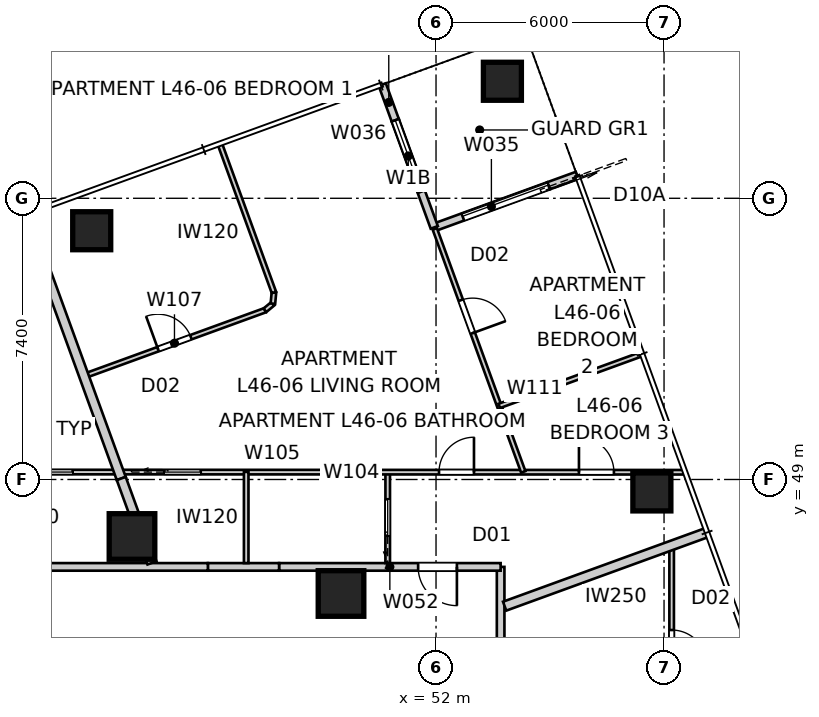
"""IFC4 building model, lengths in metres.
Left out: names, types, materials, properties, quantities, classifications, styles, units other than length and angle.
Written with IfcOpenShell. Run it as: python <this file> out.ifc"""

import sys

from ifc_helpers import new_model, si_unit, direction, frame, frame_2d, origin, origin_2d, place, context, subcontext, project, spatial, rectangle, extrude, element, fill, save


model = new_model("IFC4")
c1 = context("Model", 3, precision=1e-05, world=origin(), true_north=direction((0.0, 1.0)))
c2 = subcontext(c1, "Body", "Model", "MODEL_VIEW")
j1 = project(units=[si_unit("LENGTHUNIT", "METRE"), si_unit("PLANEANGLEUNIT", "RADIAN")], contexts=[c1])
p1 = place(None, origin())
s1 = spatial("IfcSite", under=j1, at=p1, CompositionType="ELEMENT")
p2 = place(p1, origin())
s2 = spatial("IfcBuilding", under=s1, at=p2, CompositionType="ELEMENT")
p3 = place(p2, frame((0.0, 0.0, 167.6)))
s3 = spatial("IfcBuildingStorey", under=s2, at=p3, CompositionType="ELEMENT", Elevation=167.6)
for number, where, z_axis, x_axis in (
    (1, (57.68, 48.673, 0.0), (0.0, 0.0, 1.0), (1.0, 0.0, 0.0)),
    (2, (53.747, 59.479, 0.0), (0.0, 0.0, 1.0), (1.0, 0.0, 0.0)),
    (3, (42.94, 55.546, 0.0), (0.0, 0.0, 1.0), (1.0, 0.0, 0.0)),
):
    element("IfcColumn", number, at=place(p3, frame(where, z_axis=z_axis, x_axis=x_axis)), inside=s3, PredefinedType="COLUMN", context=c2, shape_type="SweptSolid", body=[
        extrude(rectangle(XDim=1.0, YDim=1.0, at=origin_2d()), origin(), (0.0, 0.0, 1.0), 3.2),
    ])
for number, where, z_axis, x_axis in (
    (4, (49.5, 46.0, 0.0), (0.0, 0.0, 1.0), (1.0, 0.0, 0.0)),
    (5, (44.0, 47.5, 0.0), (0.0, 0.0, 1.0), (1.0, 0.0, 0.0)),
):
    element("IfcColumn", number, at=place(p3, frame(where, z_axis=z_axis, x_axis=x_axis)), inside=s3, PredefinedType="COLUMN", context=c2, shape_type="SweptSolid", body=[
        extrude(rectangle(XDim=1.2, YDim=1.2, at=origin_2d()), origin(), (0.0, 0.0, 1.0), 3.4),
    ])
p4 = place(p3, frame((55.712, 57.002, 0.0), z_axis=(0.0, 0.0, 1.0), x_axis=(-0.939659694648, -0.342110593602, 0.0)))
e6 = element("IfcWall", 6, at=p4, inside=s3, PredefinedType="SOLIDWALL", context=c2, shape_type="SweptSolid", body=[
    extrude(rectangle(XDim=0.8, YDim=0.2, at=frame_2d((0.4, 0.0))), origin(), (0.0, 0.0, 1.0), 3.2),
])
p5 = place(p3, frame((54.96, 56.729, 0.0), z_axis=(0.0, 0.0, 1.0), x_axis=(-0.939693144909, -0.342018703306, 0.0)))
e7 = element("IfcWall", 7, at=p5, inside=s3, PredefinedType="SOLIDWALL", context=c2, shape_type="SweptSolid", body=[
    extrude(rectangle(XDim=3.2, YDim=0.2, at=frame_2d((1.6, 0.0))), origin(), (0.0, 0.0, 1.0), 2.588),
])
p6 = place(p5, origin())
e8 = element("IfcOpeningElement", 8, at=p6, cuts=e7, PredefinedType="OPENING", context=c2, shape_type="SweptSolid", body=[
    extrude(rectangle(XDim=2.4, YDim=2.1, at=frame_2d((1.2, 1.05))), frame((0.0, 0.11, 0.0), z_axis=(0.0, -1.0, 0.0), x_axis=(1.0, 0.0, 0.0)), (0.0, 0.0, 1.0), 0.22),
])
p7 = place(p3, frame((51.953, 55.634, 0.0), z_axis=(0.0, 0.0, 1.0), x_axis=(-0.341965219194, 0.939712609717, 0.0)))
e9 = element("IfcWall", 9, at=p7, inside=s3, PredefinedType="SOLIDWALL", context=c2, shape_type="SweptSolid", body=[
    extrude(rectangle(XDim=3.0, YDim=0.2, at=frame_2d((1.5, 0.0))), origin(), (0.0, 0.0, 1.0), 2.588),
])
p8 = place(p7, frame((1.0, 0.0, 0.4)))
e10 = element("IfcOpeningElement", 10, at=p8, cuts=e9, PredefinedType="OPENING", context=c2, shape_type="SweptSolid", body=[
    extrude(rectangle(XDim=2.0, YDim=1.8, at=frame_2d((1.0, 0.9))), frame((0.0, 0.11, 0.0), z_axis=(0.0, -1.0, 0.0), x_axis=(1.0, 0.0, 0.0)), (0.0, 0.0, 1.0), 0.22),
])
p9 = place(p3, frame((50.927, 58.453, 0.0), z_axis=(0.0, 0.0, 1.0), x_axis=(-0.342037080957, 0.939686455819, 0.0)))
e11 = element("IfcWall", 11, at=p9, inside=s3, PredefinedType="SOLIDWALL", context=c2, shape_type="SweptSolid", body=[
    extrude(rectangle(XDim=1.0, YDim=0.2, at=frame_2d((0.5, 0.0))), origin(), (0.0, 0.0, 1.0), 3.2),
])
p10 = place(p3, frame((53.7, 12.9, 0.0), z_axis=(0.0, 0.0, 1.0), x_axis=(0.0, 1.0, 0.0)))
e12 = element("IfcWall", 12, at=p10, inside=s3, PredefinedType="PARTITIONING", context=c2, shape_type="SweptSolid", body=[
    extrude(rectangle(XDim=33.8, YDim=0.2, at=frame_2d((16.9, 0.0))), origin(), (0.0, 0.0, 1.0), 3.2),
])
p11 = place(p10, frame((29.25, 0.0, 0.0)))
e13 = element("IfcOpeningElement", 13, at=p11, cuts=e12, PredefinedType="OPENING", context=c2, shape_type="SweptSolid", body=[
    extrude(rectangle(XDim=1.02, YDim=2.0, at=frame_2d((0.51, 1.0))), frame((0.0, 0.11, 0.0), z_axis=(0.0, -1.0, 0.0), x_axis=(1.0, 0.0, 0.0)), (0.0, 0.0, 1.0), 0.22),
])
p12 = place(p10, frame((2.87, 0.0, 0.0)))
e14 = element("IfcOpeningElement", 14, at=p12, cuts=e12, PredefinedType="OPENING", context=c2, shape_type="SweptSolid", body=[
    extrude(rectangle(XDim=1.02, YDim=2.34, at=frame_2d((0.51, 1.17))), frame((0.0, 0.11, 0.0), z_axis=(0.0, -1.0, 0.0), x_axis=(1.0, 0.0, 0.0)), (0.0, 0.0, 1.0), 0.22),
])
p13 = place(p3, frame((53.7, 46.7, 0.0), z_axis=(0.0, 0.0, 1.0), x_axis=(-1.0, 0.0, 0.0)))
e15 = element("IfcWall", 15, at=p13, inside=s3, PredefinedType="PARTITIONING", context=c2, shape_type="SweptSolid", body=[
    extrude(rectangle(XDim=5.83, YDim=0.2, at=frame_2d((2.915, 0.0))), origin(), (0.0, 0.0, 1.0), 3.2),
])
p14 = place(p13, frame((1.151, 0.0, 0.0)))
e16 = element("IfcOpeningElement", 16, at=p14, cuts=e15, PredefinedType="OPENING", context=c2, shape_type="SweptSolid", body=[
    extrude(rectangle(XDim=1.02, YDim=2.34, at=frame_2d((0.51, 1.17))), frame((0.0, 0.11, 0.0), z_axis=(0.0, -1.0, 0.0), x_axis=(1.0, 0.0, 0.0)), (0.0, 0.0, 1.0), 0.22),
])
p15 = place(p3, frame((47.87, 46.7, 0.0), z_axis=(0.0, 0.0, 1.0), x_axis=(-1.0, 0.0, 0.0)))
e17 = element("IfcWall", 17, at=p15, inside=s3, PredefinedType="PARTITIONING", context=c2, shape_type="SweptSolid", body=[
    extrude(rectangle(XDim=1.874, YDim=0.2, at=frame_2d((0.937, 0.0))), origin(), (0.0, 0.0, 1.0), 2.2),
])
p16 = place(p3, frame((45.997, 46.7, 0.0), z_axis=(0.0, 0.0, 1.0), x_axis=(-1.0, 0.0, 0.0)))
e18 = element("IfcWall", 18, at=p16, inside=s3, PredefinedType="PARTITIONING", context=c2, shape_type="SweptSolid", body=[
    extrude(rectangle(XDim=11.993, YDim=0.2, at=frame_2d((5.997, 0.0))), origin(), (0.0, 0.0, 1.0), 3.2),
])
p17 = place(p3, frame((59.132, 47.605, 0.0), z_axis=(0.0, 0.0, 1.0), x_axis=(-0.939690274876, -0.342026588591, 0.0)))
e19 = element("IfcWall", 19, at=p17, inside=s3, PredefinedType="PARTITIONING", context=c2, shape_type="SweptSolid", body=[
    extrude(rectangle(XDim=5.669, YDim=0.25, at=frame_2d((2.834, 0.0))), origin(), (0.0, 0.0, 1.0), 3.2),
])
p18 = place(p3, frame((41.531, 55.033, 0.0), z_axis=(0.0, 0.0, 1.0), x_axis=(0.341991425514, -0.939703072718, 0.0)))
e20 = element("IfcWall", 20, at=p18, inside=s3, PredefinedType="PARTITIONING", context=c2, shape_type="SweptSolid", body=[
    extrude(rectangle(XDim=6.393, YDim=0.25, at=frame_2d((3.196, 0.0))), origin(), (0.0, 0.0, 1.0), 2.588),
])
p19 = place(p3, frame((43.717, 49.026, 0.0), z_axis=(0.0, 0.0, 1.0), x_axis=(0.342049950026, -0.939681771499, 0.0)))
e21 = element("IfcWall", 21, at=p19, inside=s3, PredefinedType="PARTITIONING", context=c2, shape_type="SweptSolid", body=[
    extrude(rectangle(XDim=2.363, YDim=0.25, at=frame_2d((1.182, 0.0))), origin(), (0.0, 0.0, 1.0), 3.2),
])
p20 = place(p3, frame((58.2, 47.266, 0.0), z_axis=(0.0, 0.0, 1.0), x_axis=(0.0, -1.0, 0.0)))
e22 = element("IfcWall", 22, at=p20, inside=s3, PredefinedType="PARTITIONING", context=c2, shape_type="SweptSolid", body=[
    extrude(rectangle(XDim=36.14, YDim=0.12, at=frame_2d((18.07, 0.0))), origin(), (0.0, 0.0, 1.0), 3.2),
])
p21 = place(p20, frame((2.227, 0.0, 0.0)))
e23 = element("IfcOpeningElement", 23, at=p21, cuts=e22, PredefinedType="OPENING", context=c2, shape_type="SweptSolid", body=[
    extrude(rectangle(XDim=0.92, YDim=2.34, at=frame_2d((0.46, 1.17))), frame((0.0, 0.07, 0.0), z_axis=(0.0, -1.0, 0.0), x_axis=(1.0, 0.0, 0.0)), (0.0, 0.0, 1.0), 0.14),
])
p22 = place(p20, frame((5.95, 0.0, 0.0)))
e24 = element("IfcOpeningElement", 24, at=p22, cuts=e22, PredefinedType="OPENING", context=c2, shape_type="SweptSolid", body=[
    extrude(rectangle(XDim=0.92, YDim=2.34, at=frame_2d((0.46, 1.17))), frame((0.0, 0.07, 0.0), z_axis=(0.0, -1.0, 0.0), x_axis=(1.0, 0.0, 0.0)), (0.0, 0.0, 1.0), 0.14),
])
p23 = place(p20, frame((29.769, 0.0, 0.0)))
e25 = element("IfcOpeningElement", 25, at=p23, cuts=e22, PredefinedType="OPENING", context=c2, shape_type="SweptSolid", body=[
    extrude(rectangle(XDim=0.92, YDim=2.34, at=frame_2d((0.46, 1.17))), frame((0.0, 0.07, 0.0), z_axis=(0.0, -1.0, 0.0), x_axis=(1.0, 0.0, 0.0)), (0.0, 0.0, 1.0), 0.14),
])
p24 = place(p20, frame((14.168, 0.0, 0.0)))
e26 = element("IfcOpeningElement", 26, at=p24, cuts=e22, PredefinedType="OPENING", context=c2, shape_type="SweptSolid", body=[
    extrude(rectangle(XDim=0.92, YDim=2.34, at=frame_2d((0.46, 1.17))), frame((0.0, 0.07, 0.0), z_axis=(0.0, -1.0, 0.0), x_axis=(1.0, 0.0, 0.0)), (0.0, 0.0, 1.0), 0.14),
])
p25 = place(p20, frame((33.434, 0.0, 0.0)))
e27 = element("IfcOpeningElement", 27, at=p25, cuts=e22, PredefinedType="OPENING", context=c2, shape_type="SweptSolid", body=[
    extrude(rectangle(XDim=0.92, YDim=2.34, at=frame_2d((0.46, 1.17))), frame((0.0, 0.07, 0.0), z_axis=(0.0, -1.0, 0.0), x_axis=(1.0, 0.0, 0.0)), (0.0, 0.0, 1.0), 0.14),
])
p26 = place(p3, frame((50.729, 46.8, 0.0), z_axis=(0.0, 0.0, 1.0), x_axis=(0.0, 1.0, 0.0)))
e28 = element("IfcWall", 28, at=p26, inside=s3, PredefinedType="PARTITIONING", context=c2, shape_type="SweptSolid", body=[
    extrude(rectangle(XDim=2.4, YDim=0.12, at=frame_2d((1.2, 0.0))), origin(), (0.0, 0.0, 1.0), 3.2),
])
p27 = place(p26, frame((0.72, 0.0, 0.0)))
e29 = element("IfcOpeningElement", 29, at=p27, cuts=e28, PredefinedType="OPENING", context=c2, shape_type="SweptSolid", body=[
    extrude(rectangle(XDim=0.96, YDim=2.1, at=frame_2d((0.48, 1.05))), frame((0.0, 0.07, 0.0), z_axis=(0.0, -1.0, 0.0), x_axis=(1.0, 0.0, 0.0)), (0.0, 0.0, 1.0), 0.14),
])
p28 = place(p3, frame((27.691, 49.2, 0.0), z_axis=(0.0, 0.0, 1.0), x_axis=(0.999999952285, -0.000308918217, 0.0)))
e30 = element("IfcWall", 30, at=p28, inside=s3, PredefinedType="PARTITIONING", context=c2, shape_type="SweptSolid", body=[
    extrude(rectangle(XDim=30.822, YDim=0.12, at=frame_2d((15.411, 0.0))), origin(), (0.0, 0.0, 1.0), 3.2),
])
p29 = place(p28, frame((5.882, 0.0, 0.0)))
e31 = element("IfcOpeningElement", 31, at=p29, cuts=e30, PredefinedType="OPENING", context=c2, shape_type="SweptSolid", body=[
    extrude(rectangle(XDim=0.92, YDim=2.34, at=frame_2d((0.46, 1.17))), frame((0.0, 0.07, 0.0), z_axis=(0.0, -1.0, 0.0), x_axis=(1.0, 0.0, 0.0)), (0.0, 0.0, 1.0), 0.14),
])
p30 = place(p28, frame((28.07, 0.0, 0.0)))
e32 = element("IfcOpeningElement", 32, at=p30, cuts=e30, PredefinedType="OPENING", context=c2, shape_type="SweptSolid", body=[
    extrude(rectangle(XDim=0.92, YDim=2.34, at=frame_2d((0.46, 1.17))), frame((0.0, 0.07, 0.0), z_axis=(0.0, -1.0, 0.0), x_axis=(1.0, 0.0, 0.0)), (0.0, 0.0, 1.0), 0.14),
])
p31 = place(p28, frame((24.388, 0.0, 0.0)))
e33 = element("IfcOpeningElement", 33, at=p31, cuts=e30, PredefinedType="OPENING", context=c2, shape_type="SweptSolid", body=[
    extrude(rectangle(XDim=0.92, YDim=2.34, at=frame_2d((0.46, 1.17))), frame((0.0, 0.07, 0.0), z_axis=(0.0, -1.0, 0.0), x_axis=(1.0, 0.0, 0.0)), (0.0, 0.0, 1.0), 0.14),
])
p32 = place(p28, frame((1.506, 0.0, 0.0)))
e34 = element("IfcOpeningElement", 34, at=p32, cuts=e30, PredefinedType="OPENING", context=c2, shape_type="SweptSolid", body=[
    extrude(rectangle(XDim=0.96, YDim=2.1, at=frame_2d((0.48, 1.05))), frame((0.0, 0.07, 0.0), z_axis=(0.0, -1.0, 0.0), x_axis=(1.0, 0.0, 0.0)), (0.0, 0.0, 1.0), 0.14),
])
p33 = place(p28, frame((17.158, 0.0, 0.0)))
e35 = element("IfcOpeningElement", 35, at=p33, cuts=e30, PredefinedType="OPENING", context=c2, shape_type="SweptSolid", body=[
    extrude(rectangle(XDim=0.96, YDim=2.1, at=frame_2d((0.48, 1.05))), frame((0.0, 0.07, 0.0), z_axis=(0.0, -1.0, 0.0), x_axis=(1.0, 0.0, 0.0)), (0.0, 0.0, 1.0), 0.14),
])
p34 = place(p28, frame((9.026, 0.0, 0.0)))
e36 = element("IfcOpeningElement", 36, at=p34, cuts=e30, PredefinedType="OPENING", context=c2, shape_type="SweptSolid", body=[
    extrude(rectangle(XDim=0.96, YDim=2.1, at=frame_2d((0.48, 1.05))), frame((0.0, 0.07, 0.0), z_axis=(0.0, -1.0, 0.0), x_axis=(1.0, 0.0, 0.0)), (0.0, 0.0, 1.0), 0.14),
])
p35 = place(p28, frame((13.788, 0.0, 0.0)))
e37 = element("IfcOpeningElement", 37, at=p35, cuts=e30, PredefinedType="OPENING", context=c2, shape_type="SweptSolid", body=[
    extrude(rectangle(XDim=0.96, YDim=2.1, at=frame_2d((0.48, 1.05))), frame((0.0, 0.07, 0.0), z_axis=(0.0, -1.0, 0.0), x_axis=(1.0, 0.0, 0.0)), (0.0, 0.0, 1.0), 0.14),
])
p36 = place(p3, frame((47.005, 46.8, 0.0), z_axis=(0.0, 0.0, 1.0), x_axis=(0.0, 1.0, 0.0)))
e38 = element("IfcWall", 38, at=p36, inside=s3, PredefinedType="PARTITIONING", context=c2, shape_type="SweptSolid", body=[
    extrude(rectangle(XDim=2.4, YDim=0.12, at=frame_2d((1.2, 0.0))), origin(), (0.0, 0.0, 1.0), 3.2),
])
p37 = place(p3, frame((42.736, 51.72, 0.0), z_axis=(0.0, 0.0, 1.0), x_axis=(0.939707596988, 0.341978993747, 0.0)))
e39 = element("IfcWall", 39, at=p37, inside=s3, PredefinedType="PARTITIONING", context=c2, shape_type="SweptSolid", body=[
    extrude(rectangle(XDim=5.068, YDim=0.12, at=frame_2d((2.534, 0.0))), origin(), (0.0, 0.0, 1.0), 3.2),
])
p38 = place(p37, frame((2.074, 0.0, 0.0)))
e40 = element("IfcOpeningElement", 40, at=p38, cuts=e39, PredefinedType="OPENING", context=c2, shape_type="SweptSolid", body=[
    extrude(rectangle(XDim=0.92, YDim=2.34, at=frame_2d((0.46, 1.17))), frame((0.0, 0.07, 0.0), z_axis=(0.0, -1.0, 0.0), x_axis=(1.0, 0.0, 0.0)), (0.0, 0.0, 1.0), 0.14),
])
p39 = place(p3, frame((47.499, 53.453, 0.0), z_axis=(0.0, 0.0, 1.0), x_axis=(0.769326440299, 0.638855874401, 0.0)))
e41 = element("IfcWall", 41, at=p39, inside=s3, PredefinedType="PARTITIONING", context=c2, shape_type="SweptSolid", body=[
    extrude(rectangle(XDim=0.271, YDim=0.12, at=frame_2d((0.136, 0.0))), origin(), (0.0, 0.0, 1.0), 3.2),
])
p40 = place(p3, frame((47.708, 53.627, 0.0), z_axis=(0.0, 0.0, 1.0), x_axis=(0.092395121176, 0.995722421955, 0.0)))
e42 = element("IfcWall", 42, at=p40, inside=s3, PredefinedType="PARTITIONING", context=c2, shape_type="SweptSolid", body=[
    extrude(rectangle(XDim=0.296, YDim=0.12, at=frame_2d((0.148, 0.0))), origin(), (0.0, 0.0, 1.0), 3.2),
])
p41 = place(p3, frame((47.735, 53.921, 0.0), z_axis=(0.0, 0.0, 1.0), x_axis=(-0.342004304159, 0.93969838562, 0.0)))
e43 = element("IfcWall", 43, at=p41, inside=s3, PredefinedType="PARTITIONING", context=c2, shape_type="SweptSolid", body=[
    extrude(rectangle(XDim=4.127, YDim=0.12, at=frame_2d((2.063, 0.0))), origin(), (0.0, 0.0, 1.0), 3.2),
])
p42 = place(p3, frame((51.967, 55.597, 0.0), z_axis=(0.0, 0.0, 1.0), x_axis=(0.342039648023, -0.939685521427, 0.0)))
e44 = element("IfcWall", 44, at=p42, inside=s3, PredefinedType="PARTITIONING", context=c2, shape_type="SweptSolid", body=[
    extrude(rectangle(XDim=6.807, YDim=0.12, at=frame_2d((3.404, 0.0))), origin(), (0.0, 0.0, 1.0), 3.2),
])
p43 = place(p42, frame((2.0, 0.0, 0.0)))
e45 = element("IfcOpeningElement", 45, at=p43, cuts=e44, PredefinedType="OPENING", context=c2, shape_type="SweptSolid", body=[
    extrude(rectangle(XDim=0.92, YDim=2.34, at=frame_2d((0.46, 1.17))), frame((0.0, 0.07, 0.0), z_axis=(0.0, -1.0, 0.0), x_axis=(1.0, 0.0, 0.0)), (0.0, 0.0, 1.0), 0.14),
])
p44 = place(p3, frame((57.385, 52.29, 0.0), z_axis=(0.0, 0.0, 1.0), x_axis=(-0.939685374709, -0.342040051101, 0.0)))
e46 = element("IfcWall", 46, at=p44, inside=s3, PredefinedType="PARTITIONING", context=c2, shape_type="SweptSolid", body=[
    extrude(rectangle(XDim=3.96, YDim=0.12, at=frame_2d((1.98, 0.0))), origin(), (0.0, 0.0, 1.0), 3.2),
])
p45 = place(p6, origin())
e47 = element("IfcDoor", 47, at=p45, inside=s3, OperationType="SLIDING_TO_LEFT", PredefinedType="DOOR", context=c2, shape_type="SweptSolid", body=[
    extrude(rectangle(XDim=2.4, YDim=2.1, at=frame_2d((1.2, 1.05))), frame((0.0, 0.025, 0.0), z_axis=(0.0, -1.0, 0.0), x_axis=(1.0, 0.0, 0.0)), (0.0, 0.0, 1.0), 0.05),
])
fill(e8, e47)
p46 = place(p8, origin())
e48 = element("IfcWindow", 48, at=p46, inside=s3, PartitioningType="SINGLE_PANEL", PredefinedType="WINDOW", context=c2, shape_type="SweptSolid", body=[
    extrude(rectangle(XDim=2.0, YDim=1.8, at=frame_2d((1.0, 0.9))), frame((0.0, 0.03, 0.0), z_axis=(0.0, -1.0, 0.0), x_axis=(1.0, 0.0, 0.0)), (0.0, 0.0, 1.0), 0.06),
])
fill(e10, e48)
p47 = place(p14, origin())
e49 = element("IfcDoor", 49, at=p47, inside=s3, OperationType="SINGLE_SWING_LEFT", PredefinedType="DOOR", context=c2, shape_type="SweptSolid", body=[
    extrude(rectangle(XDim=1.02, YDim=2.34, at=frame_2d((0.51, 1.17))), frame((0.0, 0.025, 0.0), z_axis=(0.0, -1.0, 0.0), x_axis=(1.0, 0.0, 0.0)), (0.0, 0.0, 1.0), 0.05),
])
fill(e16, e49)
p48 = place(p21, origin())
e50 = element("IfcDoor", 50, at=p48, inside=s3, OperationType="SINGLE_SWING_RIGHT", PredefinedType="DOOR", context=c2, shape_type="SweptSolid", body=[
    extrude(rectangle(XDim=0.92, YDim=2.34, at=frame_2d((0.46, 1.17))), frame((0.0, 0.025, 0.0), z_axis=(0.0, -1.0, 0.0), x_axis=(1.0, 0.0, 0.0)), (0.0, 0.0, 1.0), 0.05),
])
fill(e23, e50)
p49 = place(p30, origin())
e51 = element("IfcDoor", 51, at=p49, inside=s3, OperationType="SINGLE_SWING_LEFT", PredefinedType="DOOR", context=c2, shape_type="SweptSolid", body=[
    extrude(rectangle(XDim=0.92, YDim=2.34, at=frame_2d((0.46, 1.17))), frame((0.0, 0.025, 0.0), z_axis=(0.0, -1.0, 0.0), x_axis=(1.0, 0.0, 0.0)), (0.0, 0.0, 1.0), 0.05),
])
fill(e32, e51)
p50 = place(p31, origin())
e52 = element("IfcDoor", 52, at=p50, inside=s3, OperationType="SINGLE_SWING_RIGHT", PredefinedType="DOOR", context=c2, shape_type="SweptSolid", body=[
    extrude(rectangle(XDim=0.92, YDim=2.34, at=frame_2d((0.46, 1.17))), frame((0.0, 0.025, 0.0), z_axis=(0.0, -1.0, 0.0), x_axis=(1.0, 0.0, 0.0)), (0.0, 0.0, 1.0), 0.05),
])
fill(e33, e52)
p51 = place(p27, origin())
e53 = element("IfcDoor", 53, at=p51, inside=s3, OperationType="SLIDING_TO_LEFT", PredefinedType="DOOR", context=c2, shape_type="SweptSolid", body=[
    extrude(rectangle(XDim=0.96, YDim=2.1, at=frame_2d((0.48, 1.05))), frame((0.0, 0.025, 0.0), z_axis=(0.0, -1.0, 0.0), x_axis=(1.0, 0.0, 0.0)), (0.0, 0.0, 1.0), 0.05),
])
fill(e29, e53)
p52 = place(p43, origin())
e54 = element("IfcDoor", 54, at=p52, inside=s3, OperationType="SINGLE_SWING_RIGHT", PredefinedType="DOOR", context=c2, shape_type="SweptSolid", body=[
    extrude(rectangle(XDim=0.92, YDim=2.34, at=frame_2d((0.46, 1.17))), frame((0.0, 0.025, 0.0), z_axis=(0.0, -1.0, 0.0), x_axis=(1.0, 0.0, 0.0)), (0.0, 0.0, 1.0), 0.05),
])
fill(e45, e54)
p53 = place(p38, origin())
e55 = element("IfcDoor", 55, at=p53, inside=s3, OperationType="SINGLE_SWING_LEFT", PredefinedType="DOOR", context=c2, shape_type="SweptSolid", body=[
    extrude(rectangle(XDim=0.92, YDim=2.34, at=frame_2d((0.46, 1.17))), frame((0.0, 0.025, 0.0), z_axis=(0.0, -1.0, 0.0), x_axis=(1.0, 0.0, 0.0)), (0.0, 0.0, 1.0), 0.05),
])
fill(e40, e55)
p54 = place(p33, origin())
e56 = element("IfcDoor", 56, at=p54, inside=s3, OperationType="SLIDING_TO_LEFT", PredefinedType="DOOR", context=c2, shape_type="SweptSolid", body=[
    extrude(rectangle(XDim=0.96, YDim=2.1, at=frame_2d((0.48, 1.05))), frame((0.0, 0.025, 0.0), z_axis=(0.0, -1.0, 0.0), x_axis=(1.0, 0.0, 0.0)), (0.0, 0.0, 1.0), 0.05),
])
fill(e35, e56)
p55 = place(p35, origin())
e57 = element("IfcDoor", 57, at=p55, inside=s3, OperationType="SLIDING_TO_LEFT", PredefinedType="DOOR", context=c2, shape_type="SweptSolid", body=[
    extrude(rectangle(XDim=0.96, YDim=2.1, at=frame_2d((0.48, 1.05))), frame((0.0, 0.025, 0.0), z_axis=(0.0, -1.0, 0.0), x_axis=(1.0, 0.0, 0.0)), (0.0, 0.0, 1.0), 0.05),
])
fill(e37, e57)
save(model, sys.argv[1])
